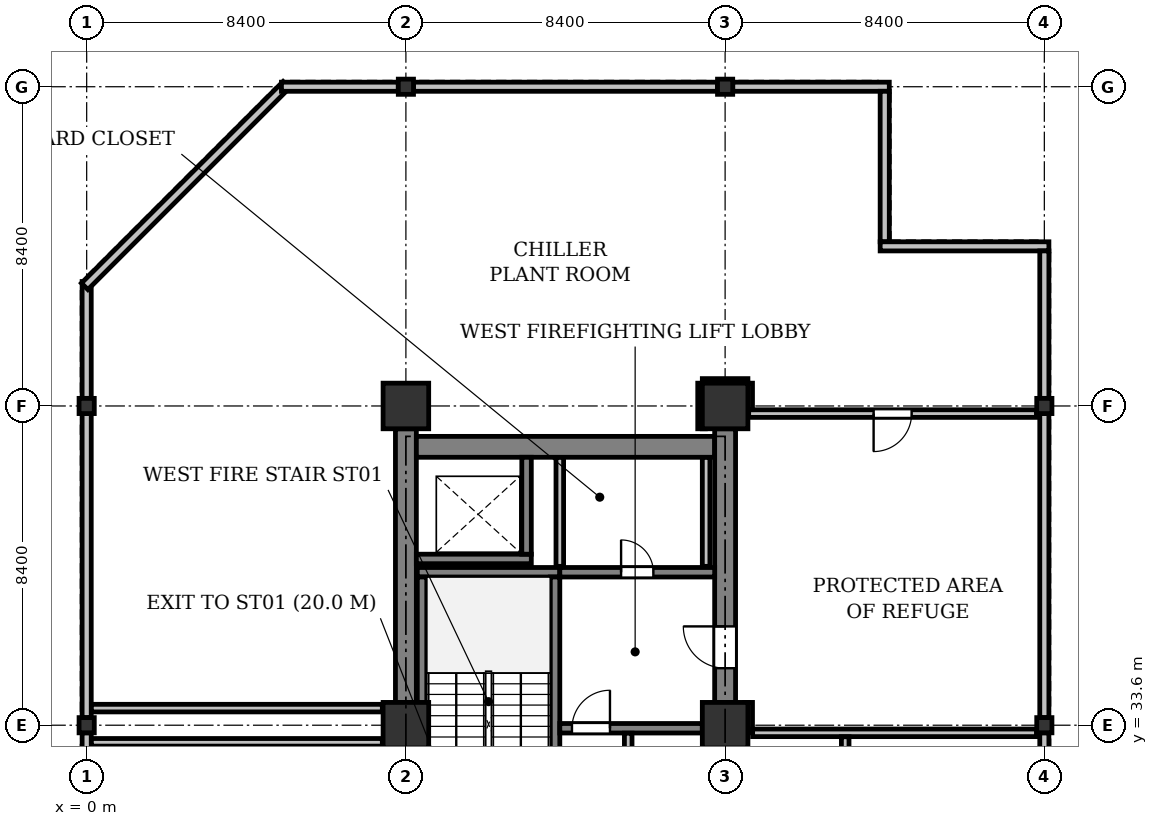
"""IFC4 building model, lengths in metres.
Left out: names, types, materials, properties, quantities, classifications, styles, units other than length and angle.
Written with IfcOpenShell. Run it as: python <this file> out.ifc"""

import sys

from ifc_helpers import new_model, si_unit, direction, frame, frame_2d, origin, origin_2d, place, context, subcontext, project, spatial, rectangle, i_section, extrude, element, fill, save


model = new_model("IFC4")
c1 = context("Model", 3, precision=1e-05, world=origin(), true_north=direction((0.0, 1.0)))
c2 = subcontext(c1, "Body", "Model", "MODEL_VIEW")
j1 = project(units=[si_unit("LENGTHUNIT", "METRE"), si_unit("PLANEANGLEUNIT", "RADIAN")], contexts=[c1])
p1 = place(None, origin())
s1 = spatial("IfcSite", under=j1, at=p1, CompositionType="ELEMENT")
p2 = place(p1, origin())
s2 = spatial("IfcBuilding", under=s1, at=p2, CompositionType="ELEMENT")
p3 = place(p2, frame((0.0, 0.0, 162.3)))
s3 = spatial("IfcBuildingStorey", under=s2, at=p3, CompositionType="ELEMENT", Elevation=162.3)
for number, where, z_axis, x_axis in (
    (1, (0.0, 33.6, 0.0), (0.0, 0.0, 1.0), (1.0, 0.0, 0.0)),
    (2, (0.0, 42.0, 0.0), (0.0, 0.0, 1.0), (1.0, 0.0, 0.0)),
):
    element("IfcColumn", number, at=place(p3, frame(where, z_axis=z_axis, x_axis=x_axis)), inside=s3, PredefinedType="COLUMN", context=c2, shape_type="SweptSolid", body=[
        extrude(i_section(OverallWidth=0.4, OverallDepth=0.4, WebThickness=0.025, FlangeThickness=0.04, at=origin_2d()), origin(), (0.0, 0.0, 1.0), 5.0),
    ])
for number, where, z_axis, x_axis in (
    (3, (8.4, 33.6, 0.0), (0.0, 0.0, 1.0), (1.0, 0.0, 0.0)),
    (4, (8.4, 42.0, 0.0), (0.0, 0.0, 1.0), (1.0, 0.0, 0.0)),
):
    element("IfcColumn", number, at=place(p3, frame(where, z_axis=z_axis, x_axis=x_axis)), inside=s3, PredefinedType="COLUMN", context=c2, shape_type="SweptSolid", body=[
        extrude(rectangle(XDim=1.2, YDim=1.2, at=origin_2d()), origin(), (0.0, 0.0, 1.0), 5.0),
    ])
p4 = place(p3, frame((8.4, 50.4, 0.0), z_axis=(0.0, 0.0, 1.0), x_axis=(1.0, 0.0, 0.0)))
e5 = element("IfcColumn", 5, at=p4, inside=s3, PredefinedType="COLUMN", context=c2, shape_type="SweptSolid", body=[
    extrude(i_section(OverallWidth=0.4, OverallDepth=0.4, WebThickness=0.025, FlangeThickness=0.04, at=origin_2d()), origin(), (0.0, 0.0, 1.0), 5.0),
])
for number, where, z_axis, x_axis in (
    (6, (16.8, 33.6, 0.0), (0.0, 0.0, 1.0), (1.0, 0.0, 0.0)),
    (7, (16.8, 42.0, 0.0), (0.0, 0.0, 1.0), (1.0, 0.0, 0.0)),
):
    element("IfcColumn", number, at=place(p3, frame(where, z_axis=z_axis, x_axis=x_axis)), inside=s3, PredefinedType="COLUMN", context=c2, shape_type="SweptSolid", body=[
        extrude(rectangle(XDim=1.2, YDim=1.2, at=origin_2d()), origin(), (0.0, 0.0, 1.0), 5.0),
    ])
for number, where, z_axis, x_axis in (
    (8, (16.8, 50.4, 0.0), (0.0, 0.0, 1.0), (1.0, 0.0, 0.0)),
    (9, (25.2, 33.6, 0.0), (0.0, 0.0, 1.0), (1.0, 0.0, 0.0)),
    (10, (25.2, 42.0, 0.0), (0.0, 0.0, 1.0), (1.0, 0.0, 0.0)),
):
    element("IfcColumn", number, at=place(p3, frame(where, z_axis=z_axis, x_axis=x_axis)), inside=s3, PredefinedType="COLUMN", context=c2, shape_type="SweptSolid", body=[
        extrude(i_section(OverallWidth=0.4, OverallDepth=0.4, WebThickness=0.025, FlangeThickness=0.04, at=origin_2d()), origin(), (0.0, 0.0, 1.0), 5.0),
    ])
for number, where, z_axis, x_axis in (
    (11, (0.0, 25.4, 0.0), (0.0, 0.0, 1.0), (0.0, 1.0, 0.0)),
    (12, (0.0, 33.8, 0.0), (0.0, 0.0, 1.0), (0.0, 1.0, 0.0)),
):
    element("IfcWall", number, at=place(p3, frame(where, z_axis=z_axis, x_axis=x_axis)), inside=s3, PredefinedType="STANDARD", context=c2, shape_type="SweptSolid", body=[
        extrude(rectangle(XDim=8.0, YDim=0.24, at=frame_2d((4.0, 0.0))), origin(), (0.0, 0.0, 1.0), 4.425),
    ])
p5 = place(p3, frame((0.0, 42.2, 0.0), z_axis=(0.0, 0.0, 1.0), x_axis=(0.0, 1.0, 0.0)))
e13 = element("IfcWall", 13, at=p5, inside=s3, PredefinedType="STANDARD", context=c2, shape_type="SweptSolid", body=[
    extrude(rectangle(XDim=3.075, YDim=0.24, at=frame_2d((1.537, 0.0))), origin(), (0.0, 0.0, 1.0), 4.725),
])
p6 = place(p3, frame((-0.053, 45.147, 0.0), z_axis=(0.0, 0.0, 1.0), x_axis=(0.707090511833, 0.707123050166, 0.0)))
e14 = element("IfcWall", 14, at=p6, inside=s3, PredefinedType="STANDARD", context=c2, shape_type="SweptSolid", body=[
    extrude(rectangle(XDim=7.503, YDim=0.24, at=frame_2d((3.751, 0.0))), origin(), (0.0, 0.0, 1.0), 4.725),
])
p7 = place(p3, frame((5.125, 50.4, 0.0), z_axis=(0.0, 0.0, 1.0), x_axis=(1.0, 0.0, 0.0)))
e15 = element("IfcWall", 15, at=p7, inside=s3, PredefinedType="STANDARD", context=c2, shape_type="SweptSolid", body=[
    extrude(rectangle(XDim=3.075, YDim=0.24, at=frame_2d((1.537, 0.0))), origin(), (0.0, 0.0, 1.0), 4.725),
])
p8 = place(p3, frame((8.6, 50.4, 0.0), z_axis=(0.0, 0.0, 1.0), x_axis=(1.0, 0.0, 0.0)))
e16 = element("IfcWall", 16, at=p8, inside=s3, PredefinedType="STANDARD", context=c2, shape_type="SweptSolid", body=[
    extrude(rectangle(XDim=8.0, YDim=0.24, at=frame_2d((4.0, 0.0))), origin(), (0.0, 0.0, 1.0), 4.425),
])
p9 = place(p3, frame((17.0, 50.4, 0.0), z_axis=(0.0, 0.0, 1.0), x_axis=(1.0, 0.0, 0.0)))
e17 = element("IfcWall", 17, at=p9, inside=s3, PredefinedType="STANDARD", context=c2, shape_type="SweptSolid", body=[
    extrude(rectangle(XDim=4.12, YDim=0.24, at=frame_2d((2.06, 0.0))), origin(), (0.0, 0.0, 1.0), 4.725),
])
p10 = place(p3, frame((21.0, 50.28, 0.0), z_axis=(0.0, 0.0, 1.0), x_axis=(0.0, -1.0, 0.0)))
e18 = element("IfcWall", 18, at=p10, inside=s3, PredefinedType="STANDARD", context=c2, shape_type="SweptSolid", body=[
    extrude(rectangle(XDim=3.96, YDim=0.24, at=frame_2d((1.98, 0.0))), origin(), (0.0, 0.0, 1.0), 4.725),
])
p11 = place(p3, frame((20.88, 46.2, 0.0), z_axis=(0.0, 0.0, 1.0), x_axis=(1.0, 0.0, 0.0)))
e19 = element("IfcWall", 19, at=p11, inside=s3, PredefinedType="STANDARD", context=c2, shape_type="SweptSolid", body=[
    extrude(rectangle(XDim=4.44, YDim=0.24, at=frame_2d((2.22, 0.0))), origin(), (0.0, 0.0, 1.0), 4.725),
])
p12 = place(p3, frame((25.2, 46.08, 0.0), z_axis=(0.0, 0.0, 1.0), x_axis=(0.0, -1.0, 0.0)))
e20 = element("IfcWall", 20, at=p12, inside=s3, PredefinedType="STANDARD", context=c2, shape_type="SweptSolid", body=[
    extrude(rectangle(XDim=3.88, YDim=0.24, at=frame_2d((1.94, 0.0))), origin(), (0.0, 0.0, 1.0), 4.725),
])
for number, where, z_axis, x_axis in (
    (21, (25.2, 41.8, 0.0), (0.0, 0.0, 1.0), (0.0, -1.0, 0.0)),
    (22, (25.2, 33.4, 0.0), (0.0, 0.0, 1.0), (0.0, -1.0, 0.0)),
):
    element("IfcWall", number, at=place(p3, frame(where, z_axis=z_axis, x_axis=x_axis)), inside=s3, PredefinedType="STANDARD", context=c2, shape_type="SweptSolid", body=[
        extrude(rectangle(XDim=8.0, YDim=0.24, at=frame_2d((4.0, 0.0))), origin(), (0.0, 0.0, 1.0), 4.425),
    ])
p13 = place(p3, frame((8.4, 34.2, 0.0), z_axis=(0.0, 0.0, 1.0), x_axis=(0.0, 1.0, 0.0)))
e23 = element("IfcWall", 23, at=p13, inside=s3, PredefinedType="SHEAR", context=c2, shape_type="SweptSolid", body=[
    extrude(rectangle(XDim=7.2, YDim=0.55, at=frame_2d((3.6, 0.0))), origin(), (0.0, 0.0, 1.0), 4.725),
])
p14 = place(p3, frame((8.675, 40.925, 0.0), z_axis=(0.0, 0.0, 1.0), x_axis=(1.0, 0.0, 0.0)))
e24 = element("IfcWall", 24, at=p14, inside=s3, PredefinedType="SHEAR", context=c2, shape_type="SweptSolid", body=[
    extrude(rectangle(XDim=7.85, YDim=0.55, at=frame_2d((3.925, 0.0))), origin(), (0.0, 0.0, 1.0), 4.725),
])
p15 = place(p3, frame((16.8, 34.2, 0.0), z_axis=(0.0, 0.0, 1.0), x_axis=(0.0, 1.0, 0.0)))
e25 = element("IfcWall", 25, at=p15, inside=s3, PredefinedType="SHEAR", context=c2, shape_type="SweptSolid", body=[
    extrude(rectangle(XDim=7.2, YDim=0.55, at=frame_2d((3.6, 0.0))), origin(), (0.0, 0.0, 1.0), 4.725),
])
p16 = place(p15, frame((0.9, 0.0, 0.0)))
e26 = element("IfcOpeningElement", 26, at=p16, cuts=e25, PredefinedType="OPENING", context=c2, shape_type="SweptSolid", body=[
    extrude(rectangle(XDim=1.1, YDim=2.15, at=frame_2d((0.55, 1.075))), frame((0.0, 0.285, 0.0), z_axis=(0.0, -1.0, 0.0), x_axis=(1.0, 0.0, 0.0)), (0.0, 0.0, 1.0), 0.57),
])
p17 = place(p3, frame((12.45, 37.625, 0.0), z_axis=(0.0, 0.0, 1.0), x_axis=(-1.0, 0.0, 0.0)))
e27 = element("IfcWall", 27, at=p17, inside=s3, PredefinedType="SHEAR", context=c2, shape_type="SweptSolid", body=[
    extrude(rectangle(XDim=3.75, YDim=0.25, at=frame_2d((1.875, 0.0))), origin(), (0.0, 0.0, 1.0), 4.725),
])
p18 = place(p3, frame((12.325, 29.75, 0.0), z_axis=(0.0, 0.0, 1.0), x_axis=(0.0, 1.0, 0.0)))
e28 = element("IfcWall", 28, at=p18, inside=s3, PredefinedType="SHEAR", context=c2, shape_type="SweptSolid", body=[
    extrude(rectangle(XDim=7.75, YDim=0.25, at=frame_2d((3.875, 0.0))), origin(), (0.0, 0.0, 1.0), 4.725),
])
p19 = place(p18, frame((0.22, 0.0, 0.0)))
e29 = element("IfcOpeningElement", 29, at=p19, cuts=e28, PredefinedType="OPENING", context=c2, shape_type="SweptSolid", body=[
    extrude(rectangle(XDim=1.1, YDim=2.15, at=frame_2d((0.55, 1.075))), frame((0.0, 0.135, 0.0), z_axis=(0.0, -1.0, 0.0), x_axis=(1.0, 0.0, 0.0)), (0.0, 0.0, 1.0), 0.27),
])
p20 = place(p3, frame((8.825, 29.75, 0.0), z_axis=(0.0, 0.0, 1.0), x_axis=(0.0, 1.0, 0.0)))
e30 = element("IfcWall", 30, at=p20, inside=s3, PredefinedType="SHEAR", context=c2, shape_type="SweptSolid", body=[
    extrude(rectangle(XDim=7.75, YDim=0.25, at=frame_2d((3.875, 0.0))), origin(), (0.0, 0.0, 1.0), 4.725),
])
p21 = place(p3, frame((8.675, 37.975, 0.0), z_axis=(0.0, 0.0, 1.0), x_axis=(1.0, 0.0, 0.0)))
e31 = element("IfcWall", 31, at=p21, inside=s3, PredefinedType="SHEAR", context=c2, shape_type="SweptSolid", body=[
    extrude(rectangle(XDim=3.025, YDim=0.25, at=frame_2d((1.512, 0.0))), origin(), (0.0, 0.0, 1.0), 4.725),
])
p22 = place(p3, frame((11.575, 38.1, 0.0), z_axis=(0.0, 0.0, 1.0), x_axis=(0.0, 1.0, 0.0)))
e32 = element("IfcWall", 32, at=p22, inside=s3, PredefinedType="SHEAR", context=c2, shape_type="SweptSolid", body=[
    extrude(rectangle(XDim=2.55, YDim=0.25, at=frame_2d((1.275, 0.0))), origin(), (0.0, 0.0, 1.0), 4.725),
])
p23 = place(p3, frame((12.45, 33.52, 0.0), z_axis=(0.0, 0.0, 1.0), x_axis=(1.0, 0.0, 0.0)))
e33 = element("IfcWall", 33, at=p23, inside=s3, PredefinedType="SHEAR", context=c2, shape_type="SweptSolid", body=[
    extrude(rectangle(XDim=3.75, YDim=0.25, at=frame_2d((1.875, 0.0))), origin(), (0.0, 0.0, 1.0), 4.725),
])
p24 = place(p23, frame((0.32, 0.0, 0.0)))
e34 = element("IfcOpeningElement", 34, at=p24, cuts=e33, PredefinedType="OPENING", context=c2, shape_type="SweptSolid", body=[
    extrude(rectangle(XDim=1.0, YDim=2.15, at=frame_2d((0.5, 1.075))), frame((0.0, 0.135, 0.0), z_axis=(0.0, -1.0, 0.0), x_axis=(1.0, 0.0, 0.0)), (0.0, 0.0, 1.0), 0.27),
])
p25 = place(p3, frame((12.45, 37.625, 0.0), z_axis=(0.0, 0.0, 1.0), x_axis=(1.0, 0.0, 0.0)))
e35 = element("IfcWall", 35, at=p25, inside=s3, PredefinedType="SHEAR", context=c2, shape_type="SweptSolid", body=[
    extrude(rectangle(XDim=4.075, YDim=0.25, at=frame_2d((2.038, 0.0))), origin(), (0.0, 0.0, 1.0), 4.725),
])
p26 = place(p25, frame((1.613, 0.0, 0.0)))
e36 = element("IfcOpeningElement", 36, at=p26, cuts=e35, PredefinedType="OPENING", context=c2, shape_type="SweptSolid", body=[
    extrude(rectangle(XDim=0.85, YDim=2.15, at=frame_2d((0.425, 1.075))), frame((0.0, 0.135, 0.0), z_axis=(0.0, -1.0, 0.0), x_axis=(1.0, 0.0, 0.0)), (0.0, 0.0, 1.0), 0.27),
])
p27 = place(p3, frame((14.25, 33.39, 0.0), z_axis=(0.0, 0.0, 1.0), x_axis=(0.0, -1.0, 0.0)))
e37 = element("IfcWall", 37, at=p27, inside=s3, PredefinedType="PARTITIONING", context=c2, shape_type="SweptSolid", body=[
    extrude(rectangle(XDim=7.74, YDim=0.2, at=frame_2d((3.87, 0.0))), origin(), (0.0, 0.0, 1.0), 4.725),
])
p28 = place(p27, frame((3.445, 0.0, 0.0)))
e38 = element("IfcOpeningElement", 38, at=p28, cuts=e37, PredefinedType="OPENING", context=c2, shape_type="SweptSolid", body=[
    extrude(rectangle(XDim=0.85, YDim=2.15, at=frame_2d((0.425, 1.075))), frame((0.0, 0.11, 0.0), z_axis=(0.0, -1.0, 0.0), x_axis=(1.0, 0.0, 0.0)), (0.0, 0.0, 1.0), 0.22),
])
for number, where, z_axis, x_axis in (
    (39, (16.3, 37.78, 0.0), (0.0, 0.0, 1.0), (0.0, 1.0, 0.0)),
    (40, (12.45, 40.646, 0.0), (0.0, 0.0, 1.0), (0.0, -1.0, 0.0)),
):
    element("IfcWall", number, at=place(p3, frame(where, z_axis=z_axis, x_axis=x_axis)), inside=s3, PredefinedType="PARTITIONING", context=c2, shape_type="SweptSolid", body=[
        extrude(rectangle(XDim=2.866, YDim=0.2, at=frame_2d((1.433, 0.0))), origin(), (0.0, 0.0, 1.0), 3.625),
    ])
p29 = place(p3, frame((17.42, 34.2, 0.0), z_axis=(0.0, 0.0, 1.0), x_axis=(0.0, -1.0, 0.0)))
e41 = element("IfcWall", 41, at=p29, inside=s3, PredefinedType="PARTITIONING", context=c2, shape_type="SweptSolid", body=[
    extrude(rectangle(XDim=0.8, YDim=0.2, at=frame_2d((0.4, 0.0))), origin(), (0.0, 0.0, 1.0), 3.825),
])
p30 = place(p3, frame((17.524, 33.4, 0.0), z_axis=(0.0, 0.0, 1.0), x_axis=(1.0, 0.0, 0.0)))
e42 = element("IfcWall", 42, at=p30, inside=s3, PredefinedType="PARTITIONING", context=c2, shape_type="SweptSolid", body=[
    extrude(rectangle(XDim=7.471, YDim=0.2, at=frame_2d((3.736, 0.0))), origin(), (0.0, 0.0, 1.0), 3.825),
])
p31 = place(p3, frame((24.995, 41.8, 0.0), z_axis=(0.0, 0.0, 1.0), x_axis=(-1.0, 0.0, 0.0)))
e43 = element("IfcWall", 43, at=p31, inside=s3, PredefinedType="PARTITIONING", context=c2, shape_type="SweptSolid", body=[
    extrude(rectangle(XDim=7.575, YDim=0.2, at=frame_2d((3.788, 0.0))), origin(), (0.0, 0.0, 1.0), 3.825),
])
p32 = place(p31, frame((3.288, 0.0, 0.0)))
e44 = element("IfcOpeningElement", 44, at=p32, cuts=e43, PredefinedType="OPENING", context=c2, shape_type="SweptSolid", body=[
    extrude(rectangle(XDim=1.0, YDim=2.15, at=frame_2d((0.5, 1.075))), frame((0.0, 0.11, 0.0), z_axis=(0.0, -1.0, 0.0), x_axis=(1.0, 0.0, 0.0)), (0.0, 0.0, 1.0), 0.22),
])
for number, where, z_axis, x_axis in (
    (45, (7.78, 33.15, 0.0), (0.0, 0.0, 1.0), (-1.0, 0.0, 0.0)),
    (46, (0.124, 34.05, 0.0), (0.0, 0.0, 1.0), (1.0, 0.0, 0.0)),
):
    element("IfcWall", number, at=place(p3, frame(where, z_axis=z_axis, x_axis=x_axis)), inside=s3, PredefinedType="PARTITIONING", context=c2, shape_type="SweptSolid", body=[
        extrude(rectangle(XDim=7.656, YDim=0.2, at=frame_2d((3.828, 0.0))), origin(), (0.0, 0.0, 1.0), 4.322),
    ])
p33 = place(p3, frame((16.18, 41.4, 0.0), z_axis=(0.0, 0.0, 1.0), x_axis=(0.0, 1.0, 0.0)))
e47 = element("IfcWall", 47, at=p33, inside=s3, PredefinedType="PARTITIONING", context=c2, shape_type="SweptSolid", body=[
    extrude(rectangle(XDim=1.2, YDim=0.2, at=frame_2d((0.6, 0.0))), origin(), (0.0, 0.0, 1.0), 3.825),
])
p34 = place(p3, frame((16.2, 42.62, 0.0), z_axis=(0.0, 0.0, 1.0), x_axis=(1.0, 0.0, 0.0)))
e48 = element("IfcWall", 48, at=p34, inside=s3, PredefinedType="PARTITIONING", context=c2, shape_type="SweptSolid", body=[
    extrude(rectangle(XDim=1.2, YDim=0.2, at=frame_2d((0.6, 0.0))), origin(), (0.0, 0.0, 1.0), 3.709),
])
p35 = place(p3, frame((17.42, 42.6, 0.0), z_axis=(0.0, 0.0, 1.0), x_axis=(0.0, -1.0, 0.0)))
e49 = element("IfcWall", 49, at=p35, inside=s3, PredefinedType="PARTITIONING", context=c2, shape_type="SweptSolid", body=[
    extrude(rectangle(XDim=0.696, YDim=0.2, at=frame_2d((0.348, 0.0))), origin(), (0.0, 0.0, 1.0), 3.825),
])
p36 = place(p3, frame((19.96, 33.296, 0.0), z_axis=(0.0, 0.0, 1.0), x_axis=(0.0, -1.0, 0.0)))
e50 = element("IfcWall", 50, at=p36, inside=s3, PredefinedType="PARTITIONING", context=c2, shape_type="SweptSolid", body=[
    extrude(rectangle(XDim=3.986, YDim=0.2, at=frame_2d((1.993, 0.0))), origin(), (0.0, 0.0, 1.0), 4.725),
])
p37 = place(p36, frame((1.493, 0.0, 0.0)))
e51 = element("IfcOpeningElement", 51, at=p37, cuts=e50, PredefinedType="OPENING", context=c2, shape_type="SweptSolid", body=[
    extrude(rectangle(XDim=1.0, YDim=2.15, at=frame_2d((0.5, 1.075))), frame((0.0, 0.11, 0.0), z_axis=(0.0, -1.0, 0.0), x_axis=(1.0, 0.0, 0.0)), (0.0, 0.0, 1.0), 0.22),
])
p38 = place(p16, origin())
e52 = element("IfcDoor", 52, at=p38, inside=s3, OperationType="SINGLE_SWING_RIGHT", PredefinedType="DOOR", context=c2, shape_type="SweptSolid", body=[
    extrude(rectangle(XDim=1.1, YDim=2.15, at=frame_2d((0.55, 1.075))), frame((0.0, 0.025, 0.0), z_axis=(0.0, -1.0, 0.0), x_axis=(1.0, 0.0, 0.0)), (0.0, 0.0, 1.0), 0.05),
])
fill(e26, e52)
p39 = place(p24, origin())
e53 = element("IfcDoor", 53, at=p39, inside=s3, OperationType="SINGLE_SWING_RIGHT", PredefinedType="DOOR", context=c2, shape_type="SweptSolid", body=[
    extrude(rectangle(XDim=1.0, YDim=2.15, at=frame_2d((0.5, 1.075))), frame((0.0, 0.025, 0.0), z_axis=(0.0, -1.0, 0.0), x_axis=(1.0, 0.0, 0.0)), (0.0, 0.0, 1.0), 0.05),
])
fill(e34, e53)
p40 = place(p26, origin())
e54 = element("IfcDoor", 54, at=p40, inside=s3, OperationType="SINGLE_SWING_LEFT", PredefinedType="DOOR", context=c2, shape_type="SweptSolid", body=[
    extrude(rectangle(XDim=0.85, YDim=2.15, at=frame_2d((0.425, 1.075))), frame((0.0, 0.025, 0.0), z_axis=(0.0, -1.0, 0.0), x_axis=(1.0, 0.0, 0.0)), (0.0, 0.0, 1.0), 0.05),
])
fill(e36, e54)
p41 = place(p32, origin())
e55 = element("IfcDoor", 55, at=p41, inside=s3, OperationType="SINGLE_SWING_RIGHT", PredefinedType="DOOR", context=c2, shape_type="SweptSolid", body=[
    extrude(rectangle(XDim=1.0, YDim=2.15, at=frame_2d((0.5, 1.075))), frame((0.0, 0.025, 0.0), z_axis=(0.0, -1.0, 0.0), x_axis=(1.0, 0.0, 0.0)), (0.0, 0.0, 1.0), 0.05),
])
fill(e44, e55)
save(model, sys.argv[1])
